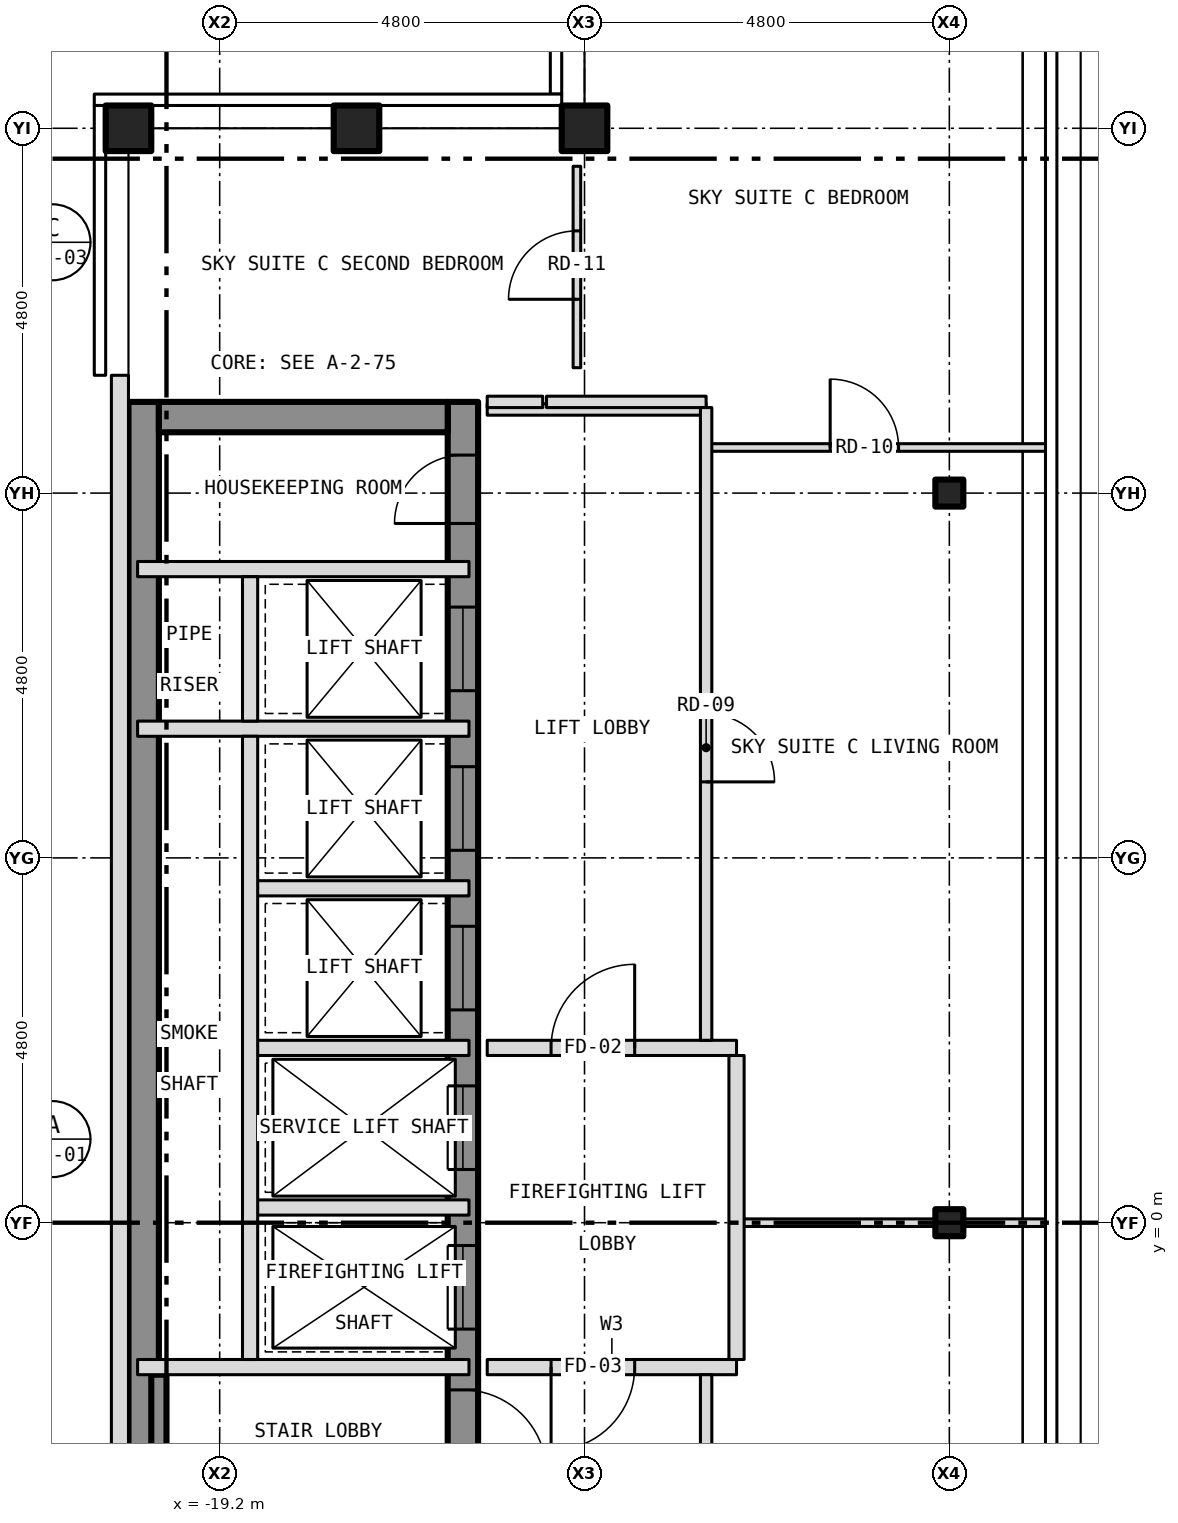
"""IFC4 building model, lengths in metres.
Left out: names, types, materials, properties, quantities, classifications, styles, units other than length and angle.
Written with IfcOpenShell. Run it as: python <this file> out.ifc"""

import sys

from ifc_helpers import new_model, si_unit, direction, frame, frame_2d, origin, origin_2d, place, context, subcontext, project, spatial, rectangle, hollow_rectangle, i_section, extrude, element, fill, save


model = new_model("IFC4")
c1 = context("Model", 3, precision=1e-05, world=origin(), true_north=direction((0.0, 1.0)))
c2 = subcontext(c1, "Body", "Model", "MODEL_VIEW")
j1 = project(units=[si_unit("LENGTHUNIT", "METRE"), si_unit("PLANEANGLEUNIT", "RADIAN")], contexts=[c1])
p1 = place(None, origin())
s1 = spatial("IfcSite", under=j1, at=p1, CompositionType="ELEMENT")
p2 = place(p1, origin())
s2 = spatial("IfcBuilding", under=s1, at=p2, CompositionType="ELEMENT")
p3 = place(p2, frame((0.0, 0.0, 272.5)))
s3 = spatial("IfcBuildingStorey", under=s2, at=p3, CompositionType="ELEMENT", Elevation=272.5)
for number, where, z_axis, x_axis in (
    (1, (-20.4, 14.4, -0.15), (0.0, 0.0, 1.0), (1.0, 0.0, 0.0)),
    (2, (-14.4, 14.4, -0.15), (0.0, 0.0, 1.0), (1.0, 0.0, 0.0)),
    (3, (-17.4, 14.4, -0.15), (0.0, 0.0, 1.0), (1.0, 0.0, 0.0)),
):
    element("IfcColumn", number, at=place(p3, frame(where, z_axis=z_axis, x_axis=x_axis)), inside=s3, PredefinedType="COLUMN", context=c2, shape_type="SweptSolid", body=[
        extrude(hollow_rectangle(XDim=0.6, YDim=0.6, WallThickness=0.03, at=origin_2d()), origin(), (0.0, 0.0, 1.0), 3.5),
    ])
for number, where, z_axis, x_axis in (
    (4, (-9.6, 0.0, -0.15), (0.0, 0.0, 1.0), (1.0, 0.0, 0.0)),
    (5, (-9.6, 9.6, -0.15), (0.0, 0.0, 1.0), (1.0, 0.0, 0.0)),
):
    element("IfcColumn", number, at=place(p3, frame(where, z_axis=z_axis, x_axis=x_axis)), inside=s3, PredefinedType="COLUMN", context=c2, shape_type="SweptSolid", body=[
        extrude(i_section(OverallWidth=0.368, OverallDepth=0.356, WebThickness=0.011, FlangeThickness=0.018, at=origin_2d()), origin(), (0.0, 0.0, 1.0), 3.5),
    ])
p4 = place(p3, frame((-16.0, -10.8, 0.0), z_axis=(0.0, 0.0, 1.0), x_axis=(0.0, 1.0, 0.0)))
e6 = element("IfcWall", 6, at=p4, inside=s3, PredefinedType="SHEAR", context=c2, shape_type="SweptSolid", body=[
    extrude(rectangle(XDim=21.6, YDim=0.4, at=frame_2d((10.8, 0.0))), origin(), (0.0, 0.0, 1.0), 3.25),
])
p5 = place(p4, frame((9.4, 0.0, 0.0)))
e7 = element("IfcOpeningElement", 7, at=p5, cuts=e6, PredefinedType="OPENING", context=c2, shape_type="SweptSolid", body=[
    extrude(rectangle(XDim=1.1, YDim=2.1, at=frame_2d((0.55, 1.05))), frame((0.0, 0.212, 0.0), z_axis=(0.0, -1.0, 0.0), x_axis=(1.0, 0.0, 0.0)), (0.0, 0.0, 1.0), 0.424),
])
p6 = place(p4, frame((11.5, 0.0, 0.0)))
e8 = element("IfcOpeningElement", 8, at=p6, cuts=e6, PredefinedType="OPENING", context=c2, shape_type="SweptSolid", body=[
    extrude(rectangle(XDim=1.1, YDim=2.1, at=frame_2d((0.55, 1.05))), frame((0.0, 0.212, 0.0), z_axis=(0.0, -1.0, 0.0), x_axis=(1.0, 0.0, 0.0)), (0.0, 0.0, 1.0), 0.424),
])
p7 = place(p4, frame((13.6, 0.0, 0.0)))
e9 = element("IfcOpeningElement", 9, at=p7, cuts=e6, PredefinedType="OPENING", context=c2, shape_type="SweptSolid", body=[
    extrude(rectangle(XDim=1.1, YDim=2.1, at=frame_2d((0.55, 1.05))), frame((0.0, 0.212, 0.0), z_axis=(0.0, -1.0, 0.0), x_axis=(1.0, 0.0, 0.0)), (0.0, 0.0, 1.0), 0.424),
])
p8 = place(p4, frame((15.7, 0.0, 0.0)))
e10 = element("IfcOpeningElement", 10, at=p8, cuts=e6, PredefinedType="OPENING", context=c2, shape_type="SweptSolid", body=[
    extrude(rectangle(XDim=1.1, YDim=2.1, at=frame_2d((0.55, 1.05))), frame((0.0, 0.212, 0.0), z_axis=(0.0, -1.0, 0.0), x_axis=(1.0, 0.0, 0.0)), (0.0, 0.0, 1.0), 0.424),
])
p9 = place(p4, frame((17.8, 0.0, 0.0)))
e11 = element("IfcOpeningElement", 11, at=p9, cuts=e6, PredefinedType="OPENING", context=c2, shape_type="SweptSolid", body=[
    extrude(rectangle(XDim=1.1, YDim=2.1, at=frame_2d((0.55, 1.05))), frame((0.0, 0.212, 0.0), z_axis=(0.0, -1.0, 0.0), x_axis=(1.0, 0.0, 0.0)), (0.0, 0.0, 1.0), 0.424),
])
p10 = place(p4, frame((0.458, 0.0, 0.0)))
e12 = element("IfcOpeningElement", 12, at=p10, cuts=e6, PredefinedType="OPENING", context=c2, shape_type="SweptSolid", body=[
    extrude(rectangle(XDim=1.1, YDim=2.1, at=frame_2d((0.55, 1.05))), frame((0.0, 0.212, 0.0), z_axis=(0.0, -1.0, 0.0), x_axis=(1.0, 0.0, 0.0)), (0.0, 0.0, 1.0), 0.424),
])
p11 = place(p4, frame((7.5, 0.0, 0.0)))
e13 = element("IfcOpeningElement", 13, at=p11, cuts=e6, PredefinedType="OPENING", context=c2, shape_type="SweptSolid", body=[
    extrude(rectangle(XDim=1.1, YDim=2.1, at=frame_2d((0.55, 1.05))), frame((0.0, 0.212, 0.0), z_axis=(0.0, -1.0, 0.0), x_axis=(1.0, 0.0, 0.0)), (0.0, 0.0, 1.0), 0.424),
])
p12 = place(p4, frame((20.0, 0.0, 0.0)))
e14 = element("IfcOpeningElement", 14, at=p12, cuts=e6, PredefinedType="OPENING", context=c2, shape_type="SweptSolid", body=[
    extrude(rectangle(XDim=0.9, YDim=2.1, at=frame_2d((0.45, 1.05))), frame((0.0, 0.212, 0.0), z_axis=(0.0, -1.0, 0.0), x_axis=(1.0, 0.0, 0.0)), (0.0, 0.0, 1.0), 0.424),
])
p13 = place(p3, frame((-20.2, -10.8, 0.0), z_axis=(0.0, 0.0, 1.0), x_axis=(0.0, 1.0, 0.0)))
e15 = element("IfcWall", 15, at=p13, inside=s3, PredefinedType="SHEAR", context=c2, shape_type="SweptSolid", body=[
    extrude(rectangle(XDim=21.6, YDim=0.4, at=frame_2d((10.8, 0.0))), origin(), (0.0, 0.0, 1.0), 3.25),
])
p14 = place(p3, frame((-20.0, 10.6, 0.0), z_axis=(0.0, 0.0, 1.0), x_axis=(1.0, 0.0, 0.0)))
e16 = element("IfcWall", 16, at=p14, inside=s3, PredefinedType="SHEAR", context=c2, shape_type="SweptSolid", body=[
    extrude(rectangle(XDim=3.8, YDim=0.4, at=frame_2d((1.9, 0.0))), origin(), (0.0, 0.0, 1.0), 3.25),
])
p15 = place(p3, frame((-20.512, 11.15, 0.0), z_axis=(0.0, 0.0, 1.0), x_axis=(0.0, -1.0, 0.0)))
e17 = element("IfcWall", 17, at=p15, inside=s3, PredefinedType="SOLIDWALL", context=c2, shape_type="SweptSolid", body=[
    extrude(rectangle(XDim=22.3, YDim=0.225, at=frame_2d((11.15, 0.0))), origin(), (0.0, 0.0, 1.0), 3.5),
])
p16 = place(p15, frame((18.4, 0.0, 1.0)))
e18 = element("IfcOpeningElement", 18, at=p16, cuts=e17, PredefinedType="OPENING", context=c2, shape_type="SweptSolid", body=[
    extrude(rectangle(XDim=0.6, YDim=1.5, at=frame_2d((0.3, 0.75))), frame((0.0, 0.125, 0.0), z_axis=(0.0, -1.0, 0.0), x_axis=(1.0, 0.0, 0.0)), (0.0, 0.0, 1.0), 0.249),
])
p17 = place(p3, frame((-20.28, -1.9, 0.0), z_axis=(0.0, 0.0, 1.0), x_axis=(1.0, 0.0, 0.0)))
e19 = element("IfcWall", 19, at=p17, inside=s3, PredefinedType="PARTITIONING", context=c2, shape_type="SweptSolid", body=[
    extrude(rectangle(XDim=4.36, YDim=0.2, at=frame_2d((2.18, 0.0))), origin(), (0.0, 0.0, 1.0), 3.25),
])
p18 = place(p3, frame((-15.68, -1.9, 0.0), z_axis=(0.0, 0.0, 1.0), x_axis=(1.0, 0.0, 0.0)))
e20 = element("IfcWall", 20, at=p18, inside=s3, PredefinedType="PARTITIONING", context=c2, shape_type="SweptSolid", body=[
    extrude(rectangle(XDim=3.28, YDim=0.2, at=frame_2d((1.64, 0.0))), origin(), (0.0, 0.0, 1.0), 3.35),
])
p19 = place(p18, frame((0.84, 0.0, 0.0)))
e21 = element("IfcOpeningElement", 21, at=p19, cuts=e20, PredefinedType="OPENING", context=c2, shape_type="SweptSolid", body=[
    extrude(rectangle(XDim=1.1, YDim=2.1, at=frame_2d((0.55, 1.05))), frame((0.0, 0.112, 0.0), z_axis=(0.0, -1.0, 0.0), x_axis=(1.0, 0.0, 0.0)), (0.0, 0.0, 1.0), 0.224),
])
p20 = place(p3, frame((-12.4, 0.0, 0.0), z_axis=(0.0, 0.0, 1.0), x_axis=(1.0, 0.0, 0.0)))
e22 = element("IfcWall", 22, at=p20, inside=s3, PredefinedType="PARTITIONING", context=c2, shape_type="SweptSolid", body=[
    extrude(rectangle(XDim=2.616, YDim=0.1, at=frame_2d((1.308, 0.0))), origin(), (0.0, 0.0, 1.0), 2.728),
])
p21 = place(p3, frame((-9.784, 0.0, 0.0), z_axis=(0.0, 0.0, 1.0), x_axis=(1.0, 0.0, 0.0)))
e23 = element("IfcWall", 23, at=p21, inside=s3, PredefinedType="PARTITIONING", context=c2, shape_type="SweptSolid", body=[
    extrude(rectangle(XDim=1.479, YDim=0.1, at=frame_2d((0.74, 0.0))), origin(), (0.0, 0.0, 1.0), 3.35),
])
for number, where, z_axis, x_axis in (
    (24, (-18.8, 0.2, 0.0), (0.0, 0.0, 1.0), (1.0, 0.0, 0.0)),
    (25, (-18.8, 2.3, 0.0), (0.0, 0.0, 1.0), (1.0, 0.0, 0.0)),
):
    element("IfcWall", number, at=place(p3, frame(where, z_axis=z_axis, x_axis=x_axis)), inside=s3, PredefinedType="PARTITIONING", context=c2, shape_type="SweptSolid", body=[
        extrude(rectangle(XDim=2.88, YDim=0.2, at=frame_2d((1.44, 0.0))), origin(), (0.0, 0.0, 1.0), 3.25),
    ])
p22 = place(p3, frame((-15.68, 2.3, 0.0), z_axis=(0.0, 0.0, 1.0), x_axis=(1.0, 0.0, 0.0)))
e26 = element("IfcWall", 26, at=p22, inside=s3, PredefinedType="PARTITIONING", context=c2, shape_type="SweptSolid", body=[
    extrude(rectangle(XDim=3.28, YDim=0.2, at=frame_2d((1.64, 0.0))), origin(), (0.0, 0.0, 1.0), 3.35),
])
p23 = place(p22, frame((0.84, 0.0, 0.0)))
e27 = element("IfcOpeningElement", 27, at=p23, cuts=e26, PredefinedType="OPENING", context=c2, shape_type="SweptSolid", body=[
    extrude(rectangle(XDim=1.1, YDim=2.1, at=frame_2d((0.55, 1.05))), frame((0.0, 0.112, 0.0), z_axis=(0.0, -1.0, 0.0), x_axis=(1.0, 0.0, 0.0)), (0.0, 0.0, 1.0), 0.224),
])
p24 = place(p3, frame((-18.8, 4.4, 0.0), z_axis=(0.0, 0.0, 1.0), x_axis=(1.0, 0.0, 0.0)))
e28 = element("IfcWall", 28, at=p24, inside=s3, PredefinedType="PARTITIONING", context=c2, shape_type="SweptSolid", body=[
    extrude(rectangle(XDim=2.88, YDim=0.2, at=frame_2d((1.44, 0.0))), origin(), (0.0, 0.0, 1.0), 3.25),
])
for number, where, z_axis, x_axis in (
    (29, (-20.28, 6.5, 0.0), (0.0, 0.0, 1.0), (1.0, 0.0, 0.0)),
    (30, (-20.28, 8.6, 0.0), (0.0, 0.0, 1.0), (1.0, 0.0, 0.0)),
):
    element("IfcWall", number, at=place(p3, frame(where, z_axis=z_axis, x_axis=x_axis)), inside=s3, PredefinedType="PARTITIONING", context=c2, shape_type="SweptSolid", body=[
        extrude(rectangle(XDim=4.36, YDim=0.2, at=frame_2d((2.18, 0.0))), origin(), (0.0, 0.0, 1.0), 3.25),
    ])
p25 = place(p3, frame((-12.8, 10.2, 0.0), z_axis=(0.0, 0.0, 1.0), x_axis=(1.0, 0.0, 0.0)))
e31 = element("IfcWall", 31, at=p25, inside=s3, PredefinedType="PARTITIONING", context=c2, shape_type="SweptSolid", body=[
    extrude(rectangle(XDim=4.495, YDim=0.1, at=frame_2d((2.248, 0.0))), origin(), (0.0, 0.0, 1.0), 3.35),
])
p26 = place(p25, frame((1.632, 0.0, 0.0)))
e32 = element("IfcOpeningElement", 32, at=p26, cuts=e31, PredefinedType="OPENING", context=c2, shape_type="SweptSolid", body=[
    extrude(rectangle(XDim=0.9, YDim=2.1, at=frame_2d((0.45, 1.05))), frame((0.0, 0.062, 0.0), z_axis=(0.0, -1.0, 0.0), x_axis=(1.0, 0.0, 0.0)), (0.0, 0.0, 1.0), 0.124),
])
p27 = place(p3, frame((-15.68, 10.7, 0.0), z_axis=(0.0, 0.0, 1.0), x_axis=(1.0, 0.0, 0.0)))
e33 = element("IfcWall", 33, at=p27, inside=s3, PredefinedType="PARTITIONING", context=c2, shape_type="SweptSolid", body=[
    extrude(rectangle(XDim=2.88, YDim=0.15, at=frame_2d((1.44, 0.0))), origin(), (0.0, 0.0, 1.0), 3.35),
])
p28 = place(p3, frame((-15.68, 10.8, 0.0), z_axis=(0.0, 0.0, 1.0), x_axis=(1.0, 0.0, 0.0)))
e34 = element("IfcWall", 34, at=p28, inside=s3, PredefinedType="PARTITIONING", context=c2, shape_type="SweptSolid", body=[
    extrude(rectangle(XDim=0.73, YDim=0.15, at=frame_2d((0.365, 0.0))), origin(), (0.0, 0.0, 1.0), 3.35),
])
p29 = place(p3, frame((-14.9, 10.8, 0.0), z_axis=(0.0, 0.0, 1.0), x_axis=(1.0, 0.0, 0.0)))
e35 = element("IfcWall", 35, at=p29, inside=s3, PredefinedType="PARTITIONING", context=c2, shape_type="SweptSolid", body=[
    extrude(rectangle(XDim=2.1, YDim=0.15, at=frame_2d((1.05, 0.0))), origin(), (0.0, 0.0, 1.0), 3.35),
])
p30 = place(p3, frame((-20.0, -10.68, 0.0), z_axis=(0.0, 0.0, 1.0), x_axis=(0.0, 1.0, 0.0)))
e36 = element("IfcWall", 36, at=p30, inside=s3, PredefinedType="SHEAR", context=c2, shape_type="SweptSolid", body=[
    extrude(rectangle(XDim=8.68, YDim=0.2, at=frame_2d((4.34, 0.0))), origin(), (0.0, 0.0, 1.0), 3.25),
])
p31 = place(p3, frame((-18.8, -1.8, 0.0), z_axis=(0.0, 0.0, 1.0), x_axis=(0.0, 1.0, 0.0)))
e37 = element("IfcWall", 37, at=p31, inside=s3, PredefinedType="PARTITIONING", context=c2, shape_type="SweptSolid", body=[
    extrude(rectangle(XDim=8.2, YDim=0.2, at=frame_2d((4.1, 0.0))), origin(), (0.0, 0.0, 1.0), 3.25),
])
p32 = place(p3, frame((-18.8, 6.6, 0.0), z_axis=(0.0, 0.0, 1.0), x_axis=(0.0, 1.0, 0.0)))
e38 = element("IfcWall", 38, at=p32, inside=s3, PredefinedType="PARTITIONING", context=c2, shape_type="SweptSolid", body=[
    extrude(rectangle(XDim=1.9, YDim=0.2, at=frame_2d((0.95, 0.0))), origin(), (0.0, 0.0, 1.0), 3.25),
])
p33 = place(p3, frame((-14.5, 11.25, 0.0), z_axis=(0.0, 0.0, 1.0), x_axis=(0.0, 1.0, 0.0)))
e39 = element("IfcWall", 39, at=p33, inside=s3, PredefinedType="PARTITIONING", context=c2, shape_type="SweptSolid", body=[
    extrude(rectangle(XDim=2.65, YDim=0.1, at=frame_2d((1.325, 0.0))), origin(), (0.0, 0.0, 1.0), 2.817),
])
p34 = place(p33, frame((0.9, 0.0, 0.0)))
e40 = element("IfcOpeningElement", 40, at=p34, cuts=e39, PredefinedType="OPENING", context=c2, shape_type="SweptSolid", body=[
    extrude(rectangle(XDim=0.9, YDim=2.1, at=frame_2d((0.45, 1.05))), frame((0.0, 0.062, 0.0), z_axis=(0.0, -1.0, 0.0), x_axis=(1.0, 0.0, 0.0)), (0.0, 0.0, 1.0), 0.124),
])
p35 = place(p3, frame((-12.8, -10.725, 0.0), z_axis=(0.0, 0.0, 1.0), x_axis=(0.0, 1.0, 0.0)))
e41 = element("IfcWall", 41, at=p35, inside=s3, PredefinedType="PARTITIONING", context=c2, shape_type="SweptSolid", body=[
    extrude(rectangle(XDim=8.725, YDim=0.15, at=frame_2d((4.363, 0.0))), origin(), (0.0, 0.0, 1.0), 3.35),
])
p36 = place(p35, frame((4.735, 0.0, 0.0)))
e42 = element("IfcOpeningElement", 42, at=p36, cuts=e41, PredefinedType="OPENING", context=c2, shape_type="SweptSolid", body=[
    extrude(rectangle(XDim=0.9, YDim=2.1, at=frame_2d((0.45, 1.05))), frame((0.0, 0.087, 0.0), z_axis=(0.0, -1.0, 0.0), x_axis=(1.0, 0.0, 0.0)), (0.0, 0.0, 1.0), 0.174),
])
p37 = place(p3, frame((-12.8, 2.4, 0.0), z_axis=(0.0, 0.0, 1.0), x_axis=(0.0, 1.0, 0.0)))
e43 = element("IfcWall", 43, at=p37, inside=s3, PredefinedType="PARTITIONING", context=c2, shape_type="SweptSolid", body=[
    extrude(rectangle(XDim=8.325, YDim=0.15, at=frame_2d((4.163, 0.0))), origin(), (0.0, 0.0, 1.0), 3.35),
])
p38 = place(p37, frame((3.4, 0.0, 0.0)))
e44 = element("IfcOpeningElement", 44, at=p38, cuts=e43, PredefinedType="OPENING", context=c2, shape_type="SweptSolid", body=[
    extrude(rectangle(XDim=0.9, YDim=2.1, at=frame_2d((0.45, 1.05))), frame((0.0, 0.087, 0.0), z_axis=(0.0, -1.0, 0.0), x_axis=(1.0, 0.0, 0.0)), (0.0, 0.0, 1.0), 0.174),
])
p39 = place(p3, frame((-12.4, -1.8, 0.0), z_axis=(0.0, 0.0, 1.0), x_axis=(0.0, 1.0, 0.0)))
e45 = element("IfcWall", 45, at=p39, inside=s3, PredefinedType="PARTITIONING", context=c2, shape_type="SweptSolid", body=[
    extrude(rectangle(XDim=4.0, YDim=0.2, at=frame_2d((2.0, 0.0))), origin(), (0.0, 0.0, 1.0), 3.35),
])
p40 = place(p5, origin())
e46 = element("IfcDoor", 46, at=p40, inside=s3, OperationType="SLIDING_TO_LEFT", PredefinedType="DOOR", context=c2, shape_type="SweptSolid", body=[
    extrude(rectangle(XDim=1.1, YDim=2.1, at=frame_2d((0.55, 1.05))), frame((0.0, 0.025, 0.0), z_axis=(0.0, -1.0, 0.0), x_axis=(1.0, 0.0, 0.0)), (0.0, 0.0, 1.0), 0.05),
])
fill(e7, e46)
p41 = place(p6, origin())
e47 = element("IfcDoor", 47, at=p41, inside=s3, OperationType="SLIDING_TO_LEFT", PredefinedType="DOOR", context=c2, shape_type="SweptSolid", body=[
    extrude(rectangle(XDim=1.1, YDim=2.1, at=frame_2d((0.55, 1.05))), frame((0.0, 0.025, 0.0), z_axis=(0.0, -1.0, 0.0), x_axis=(1.0, 0.0, 0.0)), (0.0, 0.0, 1.0), 0.05),
])
fill(e8, e47)
p42 = place(p7, origin())
e48 = element("IfcDoor", 48, at=p42, inside=s3, OperationType="SLIDING_TO_LEFT", PredefinedType="DOOR", context=c2, shape_type="SweptSolid", body=[
    extrude(rectangle(XDim=1.1, YDim=2.1, at=frame_2d((0.55, 1.05))), frame((0.0, 0.025, 0.0), z_axis=(0.0, -1.0, 0.0), x_axis=(1.0, 0.0, 0.0)), (0.0, 0.0, 1.0), 0.05),
])
fill(e9, e48)
p43 = place(p8, origin())
e49 = element("IfcDoor", 49, at=p43, inside=s3, OperationType="SLIDING_TO_LEFT", PredefinedType="DOOR", context=c2, shape_type="SweptSolid", body=[
    extrude(rectangle(XDim=1.1, YDim=2.1, at=frame_2d((0.55, 1.05))), frame((0.0, 0.025, 0.0), z_axis=(0.0, -1.0, 0.0), x_axis=(1.0, 0.0, 0.0)), (0.0, 0.0, 1.0), 0.05),
])
fill(e10, e49)
p44 = place(p9, origin())
e50 = element("IfcDoor", 50, at=p44, inside=s3, OperationType="SLIDING_TO_LEFT", PredefinedType="DOOR", context=c2, shape_type="SweptSolid", body=[
    extrude(rectangle(XDim=1.1, YDim=2.1, at=frame_2d((0.55, 1.05))), frame((0.0, 0.025, 0.0), z_axis=(0.0, -1.0, 0.0), x_axis=(1.0, 0.0, 0.0)), (0.0, 0.0, 1.0), 0.05),
])
fill(e11, e50)
p45 = place(p11, origin())
e51 = element("IfcDoor", 51, at=p45, inside=s3, OperationType="SINGLE_SWING_LEFT", PredefinedType="DOOR", context=c2, shape_type="SweptSolid", body=[
    extrude(rectangle(XDim=1.1, YDim=2.1, at=frame_2d((0.55, 1.05))), frame((0.0, 0.025, 0.0), z_axis=(0.0, -1.0, 0.0), x_axis=(1.0, 0.0, 0.0)), (0.0, 0.0, 1.0), 0.05),
])
fill(e13, e51)
p46 = place(p12, origin())
e52 = element("IfcDoor", 52, at=p46, inside=s3, OperationType="SINGLE_SWING_LEFT", PredefinedType="DOOR", context=c2, shape_type="SweptSolid", body=[
    extrude(rectangle(XDim=0.9, YDim=2.1, at=frame_2d((0.45, 1.05))), frame((0.0, 0.025, 0.0), z_axis=(0.0, -1.0, 0.0), x_axis=(1.0, 0.0, 0.0)), (0.0, 0.0, 1.0), 0.05),
])
fill(e14, e52)
p47 = place(p23, origin())
e53 = element("IfcDoor", 53, at=p47, inside=s3, OperationType="SINGLE_SWING_RIGHT", PredefinedType="DOOR", context=c2, shape_type="SweptSolid", body=[
    extrude(rectangle(XDim=1.1, YDim=2.1, at=frame_2d((0.55, 1.05))), frame((0.0, 0.025, 0.0), z_axis=(0.0, -1.0, 0.0), x_axis=(1.0, 0.0, 0.0)), (0.0, 0.0, 1.0), 0.05),
])
fill(e27, e53)
p48 = place(p19, origin())
e54 = element("IfcDoor", 54, at=p48, inside=s3, OperationType="SINGLE_SWING_LEFT", PredefinedType="DOOR", context=c2, shape_type="SweptSolid", body=[
    extrude(rectangle(XDim=1.1, YDim=2.1, at=frame_2d((0.55, 1.05))), frame((0.0, 0.025, 0.0), z_axis=(0.0, -1.0, 0.0), x_axis=(1.0, 0.0, 0.0)), (0.0, 0.0, 1.0), 0.05),
])
fill(e21, e54)
p49 = place(p38, origin())
e55 = element("IfcDoor", 55, at=p49, inside=s3, OperationType="SINGLE_SWING_LEFT", PredefinedType="DOOR", context=c2, shape_type="SweptSolid", body=[
    extrude(rectangle(XDim=0.9, YDim=2.1, at=frame_2d((0.45, 1.05))), frame((0.0, 0.025, 0.0), z_axis=(0.0, -1.0, 0.0), x_axis=(1.0, 0.0, 0.0)), (0.0, 0.0, 1.0), 0.05),
])
fill(e44, e55)
p50 = place(p26, origin())
e56 = element("IfcDoor", 56, at=p50, inside=s3, OperationType="SINGLE_SWING_LEFT", PredefinedType="DOOR", context=c2, shape_type="SweptSolid", body=[
    extrude(rectangle(XDim=0.9, YDim=2.1, at=frame_2d((0.45, 1.05))), frame((0.0, 0.025, 0.0), z_axis=(0.0, -1.0, 0.0), x_axis=(1.0, 0.0, 0.0)), (0.0, 0.0, 1.0), 0.05),
])
fill(e32, e56)
p51 = place(p34, origin())
e57 = element("IfcDoor", 57, at=p51, inside=s3, OperationType="SINGLE_SWING_LEFT", PredefinedType="DOOR", context=c2, shape_type="SweptSolid", body=[
    extrude(rectangle(XDim=0.9, YDim=2.1, at=frame_2d((0.45, 1.05))), frame((0.0, 0.025, 0.0), z_axis=(0.0, -1.0, 0.0), x_axis=(1.0, 0.0, 0.0)), (0.0, 0.0, 1.0), 0.05),
])
fill(e40, e57)
save(model, sys.argv[1])
